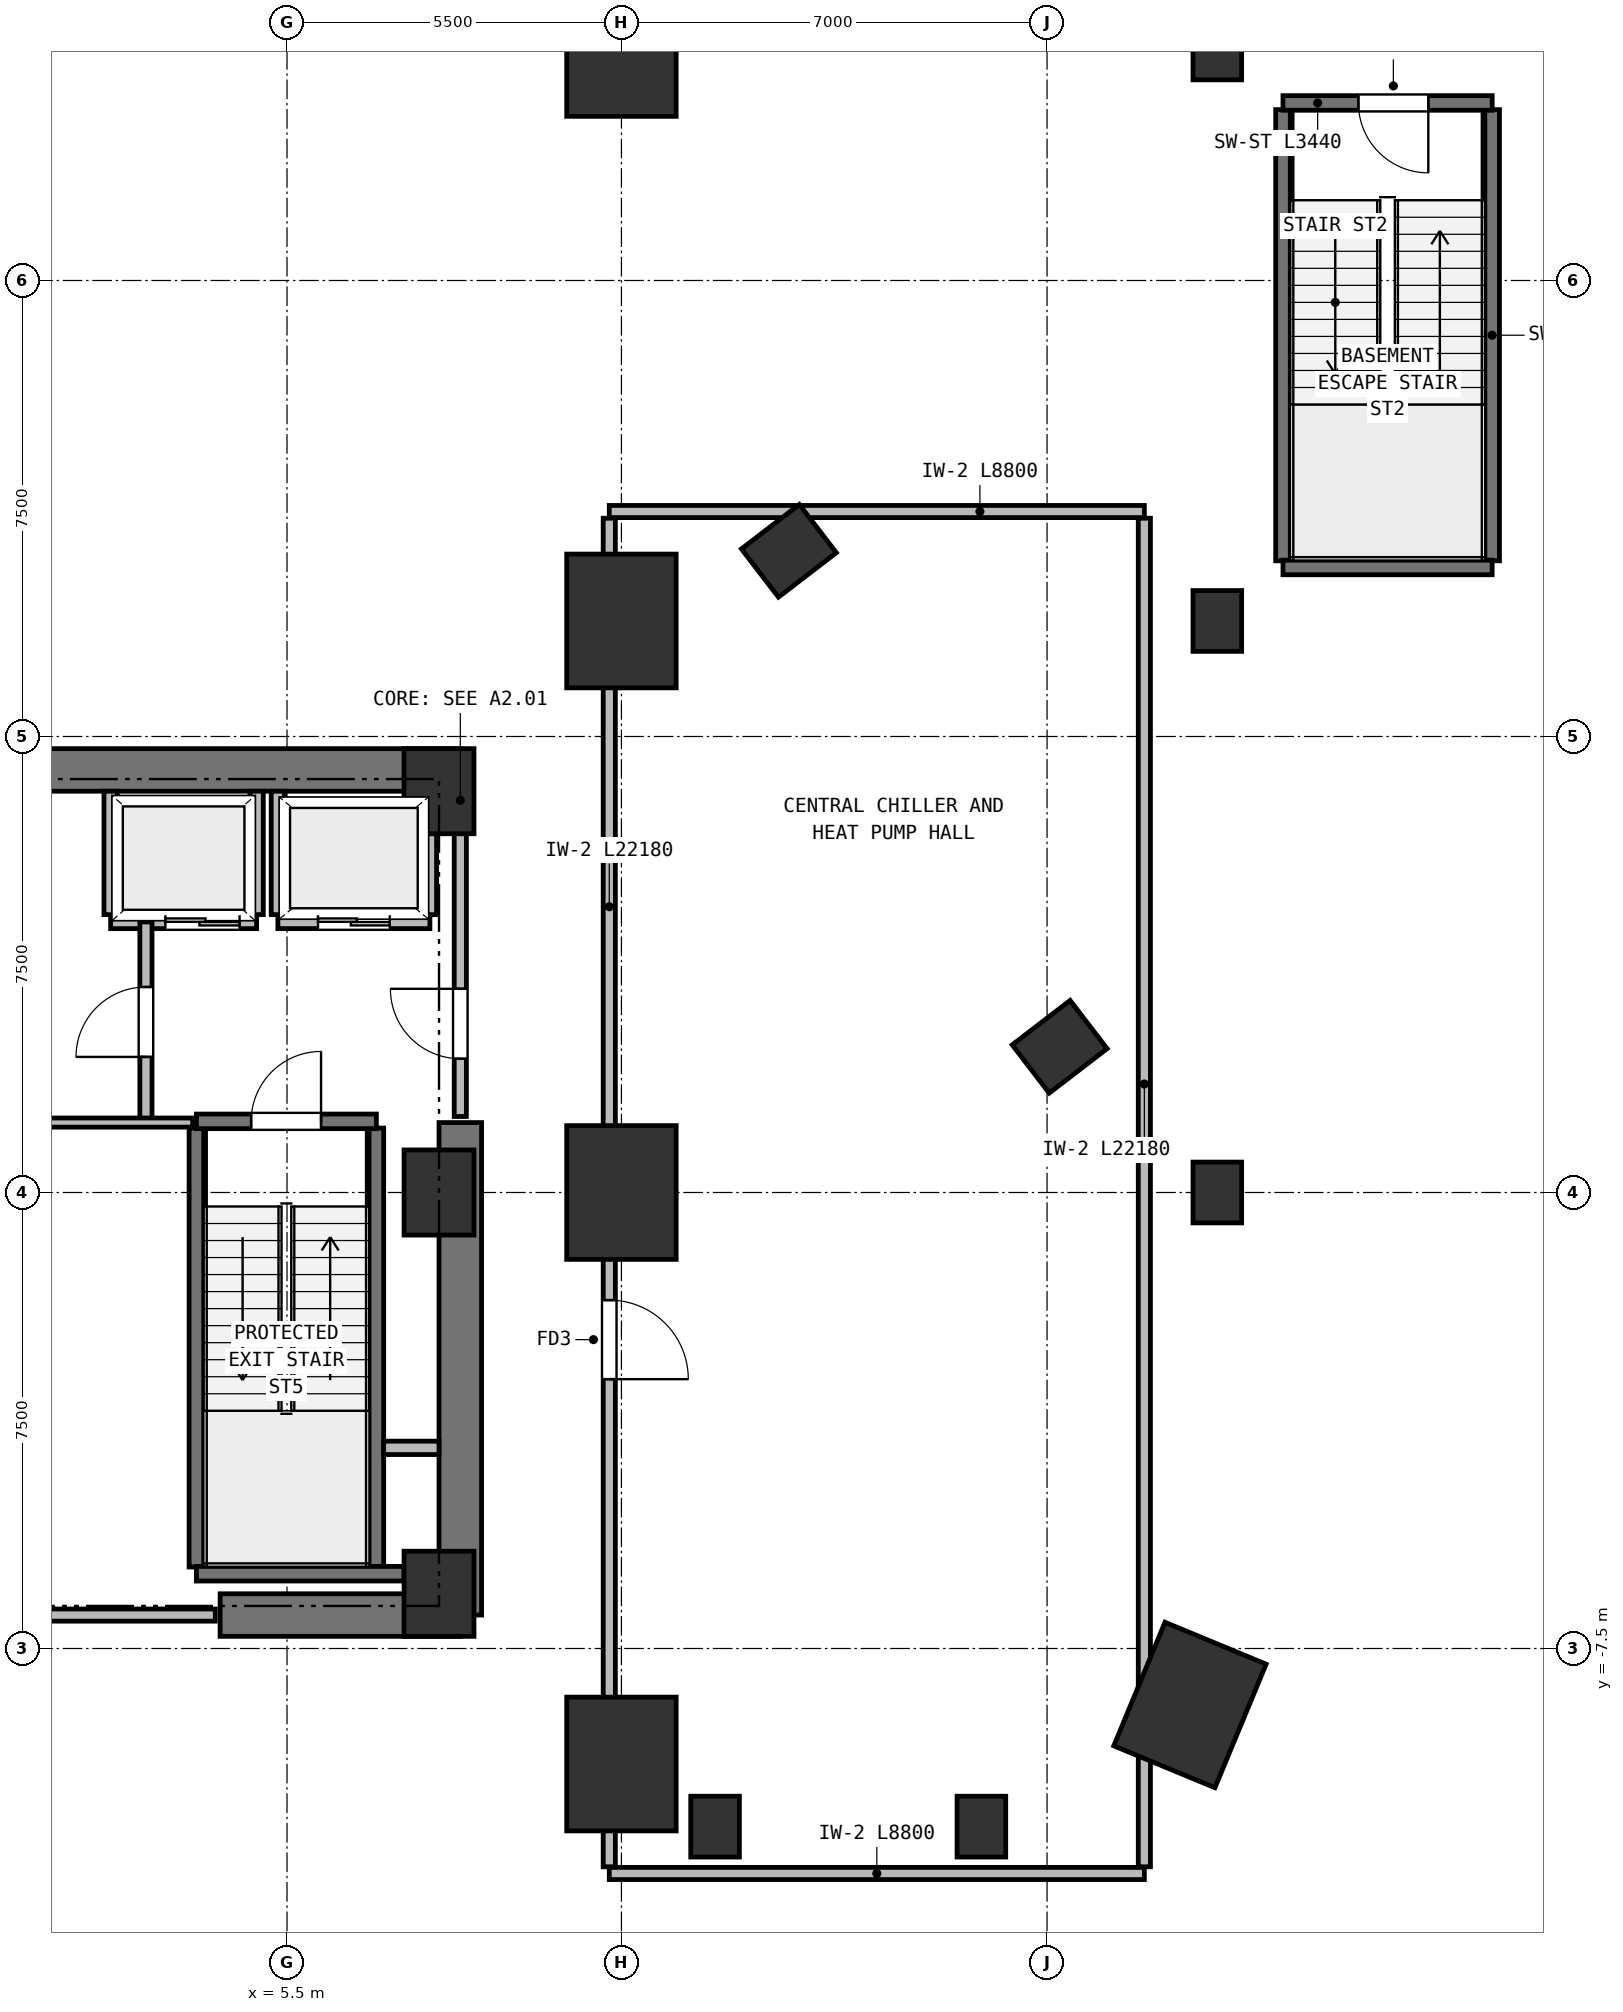
"""IFC4 building model, lengths in metres.
Left out: names, types, materials, properties, quantities, classifications, styles, units other than length and angle.
Written with IfcOpenShell. Run it as: python <this file> out.ifc"""

import sys

from ifc_helpers import new_model, si_unit, direction, frame, frame_2d, origin, origin_2d, place, context, subcontext, project, spatial, rectangle, extrude, element, fill, save


model = new_model("IFC4")
c1 = context("Model", 3, precision=1e-05, world=origin(), true_north=direction((0.0, 1.0)))
c2 = subcontext(c1, "Body", "Model", "MODEL_VIEW")
j1 = project(units=[si_unit("LENGTHUNIT", "METRE"), si_unit("PLANEANGLEUNIT", "RADIAN")], contexts=[c1])
p1 = place(None, origin())
s1 = spatial("IfcSite", under=j1, at=p1, CompositionType="ELEMENT")
p2 = place(p1, origin())
s2 = spatial("IfcBuilding", under=s1, at=p2, CompositionType="ELEMENT")
p3 = place(p2, frame((0.0, 0.0, -13.5)))
s3 = spatial("IfcBuildingStorey", under=s2, at=p3, CompositionType="ELEMENT", Elevation=-13.5)
for number, where, z_axis, x_axis in (
    (1, (8.0, -6.6, 0.0), (0.0, 0.0, 1.0), (1.0, 0.0, 0.0)),
    (2, (8.0, 0.0, 0.0), (0.0, 0.0, 1.0), (1.0, 0.0, 0.0)),
    (3, (8.0, 6.6, 0.0), (0.0, 0.0, 1.0), (1.0, 0.0, 0.0)),
):
    element("IfcColumn", number, at=place(p3, frame(where, z_axis=z_axis, x_axis=x_axis)), inside=s3, PredefinedType="COLUMN", context=c2, shape_type="SweptSolid", body=[
        extrude(rectangle(XDim=1.15, YDim=1.4, at=origin_2d()), origin(), (0.0, 0.0, 1.0), 4.5),
    ])
p4 = place(p3, frame((-8.35, 6.95, 0.0), z_axis=(0.0, 0.0, 1.0), x_axis=(1.0, 0.0, 0.0)))
e4 = element("IfcWall", 4, at=p4, inside=s3, PredefinedType="SHEAR", context=c2, shape_type="SweptSolid", body=[
    extrude(rectangle(XDim=16.7, YDim=0.7, at=frame_2d((8.35, 0.0))), origin(), (0.0, 0.0, 1.0), 4.2),
])
p5 = place(p3, frame((4.4, -6.95, 0.0), z_axis=(0.0, 0.0, 1.0), x_axis=(1.0, 0.0, 0.0)))
e5 = element("IfcWall", 5, at=p5, inside=s3, PredefinedType="SHEAR", context=c2, shape_type="SweptSolid", body=[
    extrude(rectangle(XDim=3.95, YDim=0.7, at=frame_2d((1.975, 0.0))), origin(), (0.0, 0.0, 1.0), 4.2),
])
p6 = place(p3, frame((8.35, -6.95, 0.0), z_axis=(0.0, 0.0, 1.0), x_axis=(0.0, 1.0, 0.0)))
e6 = element("IfcWall", 6, at=p6, inside=s3, PredefinedType="SHEAR", context=c2, shape_type="SweptSolid", body=[
    extrude(rectangle(XDim=8.1, YDim=0.7, at=frame_2d((4.05, 0.0))), origin(), (0.0, 0.0, 1.0), 4.2),
])
p7 = place(p3, frame((20.35, -8.429, 0.0), z_axis=(0.0, 0.0, 1.0), x_axis=(-0.923879532511, 0.382683432365, 0.0)))
e7 = element("IfcColumn", 7, at=p7, inside=s3, PredefinedType="COLUMN", context=c2, shape_type="SweptSolid", body=[
    extrude(rectangle(XDim=1.8, YDim=2.2, at=origin_2d()), origin(), (0.0, 0.0, 1.0), 4.5),
])
for number, where, z_axis, x_axis in (
    (8, (18.207, 2.397, 0.0), (0.0, 0.0, 1.0), (-0.609, 0.793, 0.0)),
    (9, (13.754, 10.554, 0.0), (0.0, 0.0, 1.0), (-0.609, 0.793, 0.0)),
):
    element("IfcColumn", number, at=place(p3, frame(where, z_axis=z_axis, x_axis=x_axis)), inside=s3, PredefinedType="COLUMN", context=c2, shape_type="SweptSolid", body=[
        extrude(rectangle(XDim=1.0, YDim=1.2, at=origin_2d()), origin(), (0.0, 0.0, 1.0), 4.5),
    ])
for number, where, z_axis, x_axis in (
    (10, (11.0, -9.4, 0.0), (0.0, 0.0, 1.0), (1.0, 0.0, 0.0)),
    (11, (11.0, 0.0, 0.0), (0.0, 0.0, 1.0), (1.0, 0.0, 0.0)),
    (12, (11.0, 9.4, 0.0), (0.0, 0.0, 1.0), (1.0, 0.0, 0.0)),
    (13, (11.0, 18.8, 0.0), (0.0, 0.0, 1.0), (1.0, 0.0, 0.0)),
):
    element("IfcColumn", number, at=place(p3, frame(where, z_axis=z_axis, x_axis=x_axis)), inside=s3, PredefinedType="COLUMN", context=c2, shape_type="SweptSolid", body=[
        extrude(rectangle(XDim=1.8, YDim=2.2, at=origin_2d()), origin(), (0.0, 0.0, 1.0), 4.5),
    ])
for number, where, z_axis, x_axis in (
    (14, (20.8, 0.0, 0.0), (0.0, 0.0, 1.0), (1.0, 0.0, 0.0)),
    (15, (20.8, 9.4, 0.0), (0.0, 0.0, 1.0), (1.0, 0.0, 0.0)),
    (16, (20.8, 18.8, 0.0), (0.0, 0.0, 1.0), (1.0, 0.0, 0.0)),
    (17, (12.54, -10.43, 0.0), (0.0, 0.0, 1.0), (1.0, 0.0, 0.0)),
    (18, (16.92, -10.43, 0.0), (0.0, 0.0, 1.0), (1.0, 0.0, 0.0)),
):
    element("IfcColumn", number, at=place(p3, frame(where, z_axis=z_axis, x_axis=x_axis)), inside=s3, PredefinedType="COLUMN", context=c2, shape_type="SweptSolid", body=[
        extrude(rectangle(XDim=0.8, YDim=1.0, at=origin_2d()), origin(), (0.0, 0.0, 1.0), 4.5),
    ])
for number, where, z_axis, x_axis in (
    (19, (4.01, -6.16, 0.0), (0.0, 0.0, 1.0), (0.0, 1.0, 0.0)),
    (20, (6.97, -6.16, 0.0), (0.0, 0.0, 1.0), (0.0, 1.0, 0.0)),
):
    element("IfcWall", number, at=place(p3, frame(where, z_axis=z_axis, x_axis=x_axis)), inside=s3, PredefinedType="SHEAR", context=c2, shape_type="SweptSolid", body=[
        extrude(rectangle(XDim=7.22, YDim=0.24, at=frame_2d((3.61, 0.0))), origin(), (0.0, 0.0, 1.0), 4.2),
    ])
p8 = place(p3, frame((4.01, -6.27, 0.0), z_axis=(0.0, 0.0, 1.0), x_axis=(1.0, 0.0, 0.0)))
e21 = element("IfcWall", 21, at=p8, inside=s3, PredefinedType="SHEAR", context=c2, shape_type="SweptSolid", body=[
    extrude(rectangle(XDim=3.415, YDim=0.24, at=frame_2d((1.708, 0.0))), origin(), (0.0, 0.0, 1.0), 4.2),
])
p9 = place(p3, frame((4.01, 1.17, 0.0), z_axis=(0.0, 0.0, 1.0), x_axis=(1.0, 0.0, 0.0)))
e22 = element("IfcWall", 22, at=p9, inside=s3, PredefinedType="SHEAR", context=c2, shape_type="SweptSolid", body=[
    extrude(rectangle(XDim=2.96, YDim=0.24, at=frame_2d((1.48, 0.0))), origin(), (0.0, 0.0, 1.0), 4.2),
])
p10 = place(p9, frame((0.9, 0.0, 0.0)))
e23 = element("IfcOpeningElement", 23, at=p10, cuts=e22, PredefinedType="OPENING", context=c2, shape_type="SweptSolid", body=[
    extrude(rectangle(XDim=1.15, YDim=2.15, at=frame_2d((0.575, 1.075))), frame((0.0, 0.13, 0.0), z_axis=(0.0, -1.0, 0.0), x_axis=(1.0, 0.0, 0.0)), (0.0, 0.0, 1.0), 0.26),
])
p11 = place(p3, frame((7.09, -4.2, 0.0), z_axis=(0.0, 0.0, 1.0), x_axis=(1.0, 0.0, 0.0)))
e24 = element("IfcWall", 24, at=p11, inside=s3, PredefinedType="PARTITIONING", context=c2, shape_type="SweptSolid", body=[
    extrude(rectangle(XDim=0.91, YDim=0.22, at=frame_2d((0.455, 0.0))), origin(), (0.0, 0.0, 1.0), 4.2),
])
p12 = place(p3, frame((5.35, 4.45, 0.0), z_axis=(0.0, 0.0, 1.0), x_axis=(1.0, 0.0, 0.0)))
e25 = element("IfcWall", 25, at=p12, inside=s3, PredefinedType="PARTITIONING", context=c2, shape_type="SweptSolid", body=[
    extrude(rectangle(XDim=2.5, YDim=0.22, at=frame_2d((1.25, 0.0))), origin(), (0.0, 0.0, 1.0), 4.2),
])
p13 = place(p12, frame((0.66, 0.0, 0.0)))
e26 = element("IfcOpeningElement", 26, at=p13, cuts=e25, PredefinedType="OPENING", context=c2, shape_type="SweptSolid", body=[
    extrude(rectangle(XDim=1.18, YDim=2.15, at=frame_2d((0.59, 1.075))), frame((0.0, 0.12, 0.0), z_axis=(0.0, -1.0, 0.0), x_axis=(1.0, 0.0, 0.0)), (0.0, 0.0, 1.0), 0.24),
])
p14 = place(p3, frame((5.35, 4.57, 0.0), z_axis=(0.0, 0.0, 1.0), x_axis=(0.0, 1.0, 0.0)))
e27 = element("IfcWall", 27, at=p14, inside=s3, PredefinedType="PARTITIONING", context=c2, shape_type="SweptSolid", body=[
    extrude(rectangle(XDim=2.03, YDim=0.22, at=frame_2d((1.015, 0.0))), origin(), (0.0, 0.0, 1.0), 4.2),
])
p15 = place(p3, frame((7.85, 4.57, 0.0), z_axis=(0.0, 0.0, 1.0), x_axis=(0.0, 1.0, 0.0)))
e28 = element("IfcWall", 28, at=p15, inside=s3, PredefinedType="PARTITIONING", context=c2, shape_type="SweptSolid", body=[
    extrude(rectangle(XDim=2.03, YDim=0.22, at=frame_2d((1.015, 0.0))), origin(), (0.0, 0.0, 1.0), 3.78),
])
p16 = place(p3, frame((2.6, 4.45, 0.0), z_axis=(0.0, 0.0, 1.0), x_axis=(1.0, 0.0, 0.0)))
e29 = element("IfcWall", 29, at=p16, inside=s3, PredefinedType="PARTITIONING", context=c2, shape_type="SweptSolid", body=[
    extrude(rectangle(XDim=2.4, YDim=0.22, at=frame_2d((1.2, 0.0))), origin(), (0.0, 0.0, 1.0), 4.2),
])
p17 = place(p16, frame((0.9, 0.0, 0.0)))
e30 = element("IfcOpeningElement", 30, at=p17, cuts=e29, PredefinedType="OPENING", context=c2, shape_type="SweptSolid", body=[
    extrude(rectangle(XDim=1.22, YDim=2.15, at=frame_2d((0.61, 1.075))), frame((0.0, 0.12, 0.0), z_axis=(0.0, -1.0, 0.0), x_axis=(1.0, 0.0, 0.0)), (0.0, 0.0, 1.0), 0.24),
])
for number, where, z_axis, x_axis in (
    (31, (2.6, 4.57, 0.0), (0.0, 0.0, 1.0), (0.0, 1.0, 0.0)),
    (32, (5.0, 4.57, 0.0), (0.0, 0.0, 1.0), (0.0, 1.0, 0.0)),
):
    element("IfcWall", number, at=place(p3, frame(where, z_axis=z_axis, x_axis=x_axis)), inside=s3, PredefinedType="PARTITIONING", context=c2, shape_type="SweptSolid", body=[
        extrude(rectangle(XDim=2.03, YDim=0.22, at=frame_2d((1.015, 0.0))), origin(), (0.0, 0.0, 1.0), 4.2),
    ])
p18 = place(p3, frame((3.18, 1.15, 0.0), z_axis=(0.0, 0.0, 1.0), x_axis=(0.0, 1.0, 0.0)))
e33 = element("IfcWall", 33, at=p18, inside=s3, PredefinedType="PARTITIONING", context=c2, shape_type="SweptSolid", body=[
    extrude(rectangle(XDim=3.3, YDim=0.2, at=frame_2d((1.65, 0.0))), origin(), (0.0, 0.0, 1.0), 4.2),
])
p19 = place(p18, frame((1.08, 0.0, 0.0)))
e34 = element("IfcOpeningElement", 34, at=p19, cuts=e33, PredefinedType="OPENING", context=c2, shape_type="SweptSolid", body=[
    extrude(rectangle(XDim=1.15, YDim=2.15, at=frame_2d((0.575, 1.075))), frame((0.0, 0.11, 0.0), z_axis=(0.0, -1.0, 0.0), x_axis=(1.0, 0.0, 0.0)), (0.0, 0.0, 1.0), 0.22),
])
p20 = place(p3, frame((8.35, 1.25, 0.0), z_axis=(0.0, 0.0, 1.0), x_axis=(0.0, 1.0, 0.0)))
e35 = element("IfcWall", 35, at=p20, inside=s3, PredefinedType="PARTITIONING", context=c2, shape_type="SweptSolid", body=[
    extrude(rectangle(XDim=5.3, YDim=0.2, at=frame_2d((2.65, 0.0))), origin(), (0.0, 0.0, 1.0), 4.2),
])
p21 = place(p20, frame((0.95, 0.0, 0.0)))
e36 = element("IfcOpeningElement", 36, at=p21, cuts=e35, PredefinedType="OPENING", context=c2, shape_type="SweptSolid", body=[
    extrude(rectangle(XDim=1.15, YDim=2.15, at=frame_2d((0.575, 1.075))), frame((0.0, 0.11, 0.0), z_axis=(0.0, -1.0, 0.0), x_axis=(1.0, 0.0, 0.0)), (0.0, 0.0, 1.0), 0.22),
])
p22 = place(p3, frame((3.95, 1.15, 0.0), z_axis=(0.0, 0.0, 1.0), x_axis=(-1.0, 0.0, 0.0)))
e37 = element("IfcWall", 37, at=p22, inside=s3, PredefinedType="PARTITIONING", context=c2, shape_type="SweptSolid", body=[
    extrude(rectangle(XDim=7.9, YDim=0.15, at=frame_2d((3.95, 0.0))), origin(), (0.0, 0.0, 1.0), 4.2),
])
p23 = place(p22, frame((3.49, 0.0, 0.0)))
e38 = element("IfcOpeningElement", 38, at=p23, cuts=e37, PredefinedType="OPENING", context=c2, shape_type="SweptSolid", body=[
    extrude(rectangle(XDim=0.92, YDim=2.05, at=frame_2d((0.46, 1.025))), frame((0.0, 0.085, 0.0), z_axis=(0.0, -1.0, 0.0), x_axis=(1.0, 0.0, 0.0)), (0.0, 0.0, 1.0), 0.17),
])
p24 = place(p3, frame((-4.32, -6.95, 0.0), z_axis=(0.0, 0.0, 1.0), x_axis=(1.0, 0.0, 0.0)))
e39 = element("IfcWall", 39, at=p24, inside=s3, PredefinedType="PARTITIONING", context=c2, shape_type="SweptSolid", body=[
    extrude(rectangle(XDim=8.64, YDim=0.2, at=frame_2d((4.32, 0.0))), origin(), (0.0, 0.0, 1.0), 4.2),
])
for number, where, z_axis, x_axis in (
    (40, (21.88, 10.39, 0.0), (0.0, 0.0, 1.0), (0.0, 1.0, 0.0)),
    (41, (25.32, 10.39, 0.0), (0.0, 0.0, 1.0), (0.0, 1.0, 0.0)),
):
    element("IfcWall", number, at=place(p3, frame(where, z_axis=z_axis, x_axis=x_axis)), inside=s3, PredefinedType="SHEAR", context=c2, shape_type="SweptSolid", body=[
        extrude(rectangle(XDim=7.42, YDim=0.24, at=frame_2d((3.71, 0.0))), origin(), (0.0, 0.0, 1.0), 4.2),
    ])
p25 = place(p3, frame((21.88, 10.28, 0.0), z_axis=(0.0, 0.0, 1.0), x_axis=(1.0, 0.0, 0.0)))
e42 = element("IfcWall", 42, at=p25, inside=s3, PredefinedType="SHEAR", context=c2, shape_type="SweptSolid", body=[
    extrude(rectangle(XDim=3.44, YDim=0.24, at=frame_2d((1.72, 0.0))), origin(), (0.0, 0.0, 1.0), 4.2),
])
p26 = place(p3, frame((25.32, 17.92, 0.0), z_axis=(0.0, 0.0, 1.0), x_axis=(-1.0, 0.0, 0.0)))
e43 = element("IfcWall", 43, at=p26, inside=s3, PredefinedType="SHEAR", context=c2, shape_type="SweptSolid", body=[
    extrude(rectangle(XDim=3.44, YDim=0.24, at=frame_2d((1.72, 0.0))), origin(), (0.0, 0.0, 1.0), 4.2),
])
p27 = place(p26, frame((1.05, 0.0, 0.0)))
e44 = element("IfcOpeningElement", 44, at=p27, cuts=e43, PredefinedType="OPENING", context=c2, shape_type="SweptSolid", body=[
    extrude(rectangle(XDim=1.15, YDim=2.15, at=frame_2d((0.575, 1.075))), frame((0.0, 0.13, 0.0), z_axis=(0.0, -1.0, 0.0), x_axis=(1.0, 0.0, 0.0)), (0.0, 0.0, 1.0), 0.26),
])
for number, where, z_axis, x_axis in (
    (45, (10.8, 11.2, 0.0), (0.0, 0.0, 1.0), (1.0, 0.0, 0.0)),
    (46, (10.8, -11.2, 0.0), (0.0, 0.0, 1.0), (1.0, 0.0, 0.0)),
):
    element("IfcWall", number, at=place(p3, frame(where, z_axis=z_axis, x_axis=x_axis)), inside=s3, PredefinedType="PARTITIONING", context=c2, shape_type="SweptSolid", body=[
        extrude(rectangle(XDim=8.8, YDim=0.2, at=frame_2d((4.4, 0.0))), origin(), (0.0, 0.0, 1.0), 4.2),
    ])
p28 = place(p3, frame((10.8, 11.09, 0.0), z_axis=(0.0, 0.0, 1.0), x_axis=(0.0, -1.0, 0.0)))
e47 = element("IfcWall", 47, at=p28, inside=s3, PredefinedType="PARTITIONING", context=c2, shape_type="SweptSolid", body=[
    extrude(rectangle(XDim=22.18, YDim=0.2, at=frame_2d((11.09, 0.0))), origin(), (0.0, 0.0, 1.0), 3.18),
])
p29 = place(p28, frame((12.86, 0.0, 0.0)))
e48 = element("IfcOpeningElement", 48, at=p29, cuts=e47, PredefinedType="OPENING", context=c2, shape_type="SweptSolid", body=[
    extrude(rectangle(XDim=1.3, YDim=2.15, at=frame_2d((0.65, 1.075))), frame((0.0, 0.11, 0.0), z_axis=(0.0, -1.0, 0.0), x_axis=(1.0, 0.0, 0.0)), (0.0, 0.0, 1.0), 0.22),
])
p30 = place(p3, frame((19.6, -11.09, 0.0), z_axis=(0.0, 0.0, 1.0), x_axis=(0.0, 1.0, 0.0)))
e49 = element("IfcWall", 49, at=p30, inside=s3, PredefinedType="PARTITIONING", context=c2, shape_type="SweptSolid", body=[
    extrude(rectangle(XDim=22.18, YDim=0.2, at=frame_2d((11.09, 0.0))), origin(), (0.0, 0.0, 1.0), 4.2),
])
p31 = place(p10, origin())
e50 = element("IfcDoor", 50, at=p31, inside=s3, OperationType="SINGLE_SWING_RIGHT", PredefinedType="DOOR", context=c2, shape_type="SweptSolid", body=[
    extrude(rectangle(XDim=1.15, YDim=2.15, at=frame_2d((0.575, 1.075))), frame((0.0, 0.025, 0.0), z_axis=(0.0, -1.0, 0.0), x_axis=(1.0, 0.0, 0.0)), (0.0, 0.0, 1.0), 0.05),
])
fill(e23, e50)
p32 = place(p13, origin())
e51 = element("IfcDoor", 51, at=p32, inside=s3, OperationType="DOUBLE_DOOR_SLIDING", PredefinedType="DOOR", context=c2, shape_type="SweptSolid", body=[
    extrude(rectangle(XDim=1.18, YDim=2.15, at=frame_2d((0.59, 1.075))), frame((0.0, 0.025, 0.0), z_axis=(0.0, -1.0, 0.0), x_axis=(1.0, 0.0, 0.0)), (0.0, 0.0, 1.0), 0.05),
])
fill(e26, e51)
p33 = place(p17, origin())
e52 = element("IfcDoor", 52, at=p33, inside=s3, OperationType="DOUBLE_DOOR_SLIDING", PredefinedType="DOOR", context=c2, shape_type="SweptSolid", body=[
    extrude(rectangle(XDim=1.22, YDim=2.15, at=frame_2d((0.61, 1.075))), frame((0.0, 0.025, 0.0), z_axis=(0.0, -1.0, 0.0), x_axis=(1.0, 0.0, 0.0)), (0.0, 0.0, 1.0), 0.05),
])
fill(e30, e52)
p34 = place(p19, origin())
e53 = element("IfcDoor", 53, at=p34, inside=s3, OperationType="SINGLE_SWING_LEFT", PredefinedType="DOOR", context=c2, shape_type="SweptSolid", body=[
    extrude(rectangle(XDim=1.15, YDim=2.15, at=frame_2d((0.575, 1.075))), frame((0.0, 0.025, 0.0), z_axis=(0.0, -1.0, 0.0), x_axis=(1.0, 0.0, 0.0)), (0.0, 0.0, 1.0), 0.05),
])
fill(e34, e53)
p35 = place(p21, origin())
e54 = element("IfcDoor", 54, at=p35, inside=s3, OperationType="SINGLE_SWING_RIGHT", PredefinedType="DOOR", context=c2, shape_type="SweptSolid", body=[
    extrude(rectangle(XDim=1.15, YDim=2.15, at=frame_2d((0.575, 1.075))), frame((0.0, 0.025, 0.0), z_axis=(0.0, -1.0, 0.0), x_axis=(1.0, 0.0, 0.0)), (0.0, 0.0, 1.0), 0.05),
])
fill(e36, e54)
p36 = place(p27, origin())
e55 = element("IfcDoor", 55, at=p36, inside=s3, OperationType="SINGLE_SWING_LEFT", PredefinedType="DOOR", context=c2, shape_type="SweptSolid", body=[
    extrude(rectangle(XDim=1.15, YDim=2.15, at=frame_2d((0.575, 1.075))), frame((0.0, 0.025, 0.0), z_axis=(0.0, -1.0, 0.0), x_axis=(1.0, 0.0, 0.0)), (0.0, 0.0, 1.0), 0.05),
])
fill(e44, e55)
p37 = place(p29, origin())
e56 = element("IfcDoor", 56, at=p37, inside=s3, OperationType="SINGLE_SWING_RIGHT", PredefinedType="DOOR", context=c2, shape_type="SweptSolid", body=[
    extrude(rectangle(XDim=1.3, YDim=2.15, at=frame_2d((0.65, 1.075))), frame((0.0, 0.025, 0.0), z_axis=(0.0, -1.0, 0.0), x_axis=(1.0, 0.0, 0.0)), (0.0, 0.0, 1.0), 0.05),
])
fill(e48, e56)
save(model, sys.argv[1])
